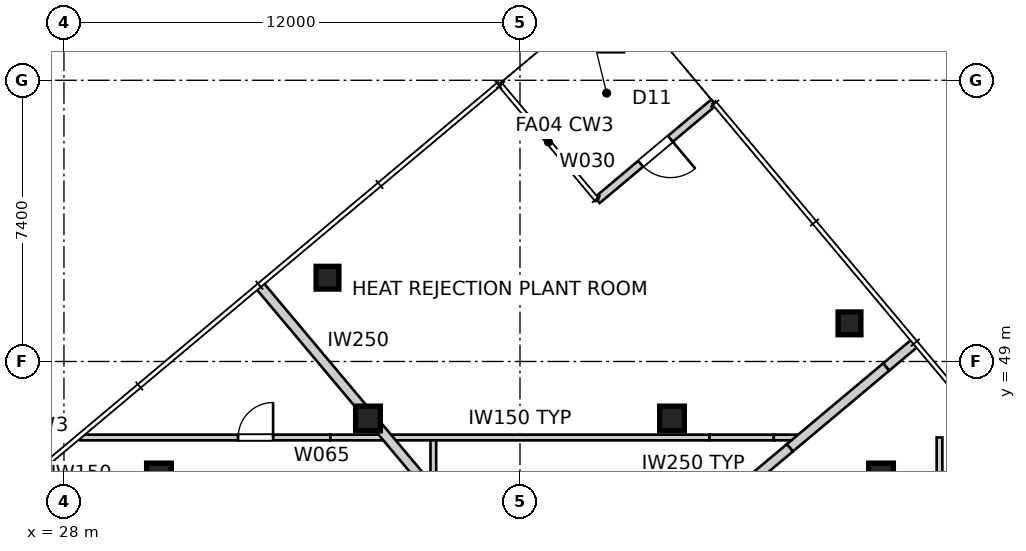
"""IFC4 building model, lengths in metres.
Left out: names, types, materials, properties, quantities, classifications, styles, units other than length and angle.
Written with IfcOpenShell. Run it as: python <this file> out.ifc"""

import sys

from ifc_helpers import new_model, si_unit, direction, frame, frame_2d, origin, origin_2d, place, context, subcontext, project, spatial, rectangle, extrude, element, fill, save


model = new_model("IFC4")
c1 = context("Model", 3, precision=1e-05, world=origin(), true_north=direction((0.0, 1.0)))
c2 = subcontext(c1, "Body", "Model", "MODEL_VIEW")
j1 = project(units=[si_unit("LENGTHUNIT", "METRE"), si_unit("PLANEANGLEUNIT", "RADIAN")], contexts=[c1])
p1 = place(None, origin())
s1 = spatial("IfcSite", under=j1, at=p1, CompositionType="ELEMENT")
p2 = place(p1, origin())
s2 = spatial("IfcBuilding", under=s1, at=p2, CompositionType="ELEMENT")
p3 = place(p2, frame((0.0, 0.0, 299.8)))
s3 = spatial("IfcBuildingStorey", under=s2, at=p3, CompositionType="ELEMENT", Elevation=299.8)
for number, where, z_axis, x_axis in (
    (1, (48.671, 50.003, 0.0), (0.0, 0.0, 1.0), (1.0, 0.0, 0.0)),
    (2, (34.935, 51.205, 0.0), (0.0, 0.0, 1.0), (1.0, 0.0, 0.0)),
):
    element("IfcColumn", number, at=place(p3, frame(where, z_axis=z_axis, x_axis=x_axis)), inside=s3, PredefinedType="COLUMN", context=c2, shape_type="SweptSolid", body=[
        extrude(rectangle(XDim=0.6, YDim=0.6, at=origin_2d()), origin(), (0.0, 0.0, 1.0), 4.5),
    ])
for number, where, z_axis, x_axis in (
    (3, (49.5, 46.0, 0.0), (0.0, 0.0, 1.0), (1.0, 0.0, 0.0)),
    (4, (44.0, 47.5, 0.0), (0.0, 0.0, 1.0), (1.0, 0.0, 0.0)),
    (5, (36.0, 47.5, 0.0), (0.0, 0.0, 1.0), (1.0, 0.0, 0.0)),
    (6, (30.5, 46.0, 0.0), (0.0, 0.0, 1.0), (1.0, 0.0, 0.0)),
):
    element("IfcColumn", number, at=place(p3, frame(where, z_axis=z_axis, x_axis=x_axis)), inside=s3, PredefinedType="COLUMN", context=c2, shape_type="SweptSolid", body=[
        extrude(rectangle(XDim=0.65, YDim=0.65, at=origin_2d()), origin(), (0.0, 0.0, 1.0), 4.5),
    ])
p4 = place(p3, frame((45.098, 55.817, 0.0), z_axis=(0.0, 0.0, 1.0), x_axis=(-0.766060656284, -0.642768287094, 0.0)))
e7 = element("IfcWall", 7, at=p4, inside=s3, PredefinedType="SOLIDWALL", context=c2, shape_type="SweptSolid", body=[
    extrude(rectangle(XDim=4.0, YDim=0.2, at=frame_2d((2.0, 0.0))), origin(), (0.0, 0.0, 1.0), 4.3),
])
p5 = place(p4, frame((1.49, 0.0, 0.0)))
e8 = element("IfcOpeningElement", 8, at=p5, cuts=e7, PredefinedType="OPENING", context=c2, shape_type="SweptSolid", body=[
    extrude(rectangle(XDim=1.02, YDim=2.1, at=frame_2d((0.51, 1.05))), frame((0.0, 0.11, 0.0), z_axis=(0.0, -1.0, 0.0), x_axis=(1.0, 0.0, 0.0)), (0.0, 0.0, 1.0), 0.22),
])
p6 = place(p3, frame((50.401, 49.497, 0.0), z_axis=(0.0, 0.0, 1.0), x_axis=(-0.766055819685, -0.64277405138, 0.0)))
e9 = element("IfcWall", 9, at=p6, inside=s3, PredefinedType="PARTITIONING", context=c2, shape_type="SweptSolid", body=[
    extrude(rectangle(XDim=1.0, YDim=0.25, at=frame_2d((0.5, 0.0))), origin(), (0.0, 0.0, 1.0), 4.3),
])
p7 = place(p3, frame((49.635, 48.854, 0.0), z_axis=(0.0, 0.0, 1.0), x_axis=(-0.766014492995, -0.642823301165, 0.0)))
e10 = element("IfcWall", 10, at=p7, inside=s3, PredefinedType="PARTITIONING", context=c2, shape_type="SweptSolid", body=[
    extrude(rectangle(XDim=3.308, YDim=0.25, at=frame_2d((1.654, 0.0))), origin(), (0.0, 0.0, 1.0), 3.688),
])
p8 = place(p3, frame((47.101, 46.728, 0.0), z_axis=(0.0, 0.0, 1.0), x_axis=(-0.766051985436, -0.642778620996, 0.0)))
e11 = element("IfcWall", 11, at=p8, inside=s3, PredefinedType="PARTITIONING", context=c2, shape_type="SweptSolid", body=[
    extrude(rectangle(XDim=4.446, YDim=0.25, at=frame_2d((2.223, 0.0))), origin(), (0.0, 0.0, 1.0), 4.3),
])
p9 = place(p3, frame((33.143, 51.007, 0.0), z_axis=(0.0, 0.0, 1.0), x_axis=(0.64278692291, -0.766045019392, 0.0)))
e12 = element("IfcWall", 12, at=p9, inside=s3, PredefinedType="PARTITIONING", context=c2, shape_type="SweptSolid", body=[
    extrude(rectangle(XDim=9.343, YDim=0.25, at=frame_2d((4.671, 0.0))), origin(), (0.0, 0.0, 1.0), 4.3),
])
for number, where, z_axis, x_axis in (
    (13, (51.039, 43.8, 0.0), (0.0, 0.0, 1.0), (0.0, 1.0, 0.0)),
    (14, (37.72, 47.0, 0.0), (0.0, 0.0, 1.0), (0.0, -1.0, 0.0)),
):
    element("IfcWall", number, at=place(p3, frame(where, z_axis=z_axis, x_axis=x_axis)), inside=s3, PredefinedType="SOLIDWALL", context=c2, shape_type="SweptSolid", body=[
        extrude(rectangle(XDim=3.2, YDim=0.15, at=frame_2d((1.6, 0.0))), origin(), (0.0, 0.0, 1.0), 4.3),
    ])
p10 = place(p3, frame((28.43, 47.0, 0.0), z_axis=(0.0, 0.0, 1.0), x_axis=(1.0, 0.0, 0.0)))
e15 = element("IfcWall", 15, at=p10, inside=s3, PredefinedType="SOLIDWALL", context=c2, shape_type="SweptSolid", body=[
    extrude(rectangle(XDim=4.154, YDim=0.15, at=frame_2d((2.077, 0.0))), origin(), (0.0, 0.0, 1.0), 4.3),
])
p11 = place(p3, frame((32.584, 47.0, 0.0), z_axis=(0.0, 0.0, 1.0), x_axis=(1.0, 0.0, 0.0)))
e16 = element("IfcWall", 16, at=p11, inside=s3, PredefinedType="SOLIDWALL", context=c2, shape_type="SweptSolid", body=[
    extrude(rectangle(XDim=2.428, YDim=0.15, at=frame_2d((1.214, 0.0))), origin(), (0.0, 0.0, 1.0), 3.3),
])
p12 = place(p11, origin())
e17 = element("IfcOpeningElement", 17, at=p12, cuts=e16, PredefinedType="OPENING", context=c2, shape_type="SweptSolid", body=[
    extrude(rectangle(XDim=0.92, YDim=2.1, at=frame_2d((0.46, 1.05))), frame((0.0, 0.085, 0.0), z_axis=(0.0, -1.0, 0.0), x_axis=(1.0, 0.0, 0.0)), (0.0, 0.0, 1.0), 0.17),
])
p13 = place(p3, frame((35.012, 47.0, 0.0), z_axis=(0.0, 0.0, 1.0), x_axis=(1.0, 0.0, 0.0)))
e18 = element("IfcWall", 18, at=p13, inside=s3, PredefinedType="SOLIDWALL", context=c2, shape_type="SweptSolid", body=[
    extrude(rectangle(XDim=9.977, YDim=0.15, at=frame_2d((4.988, 0.0))), origin(), (0.0, 0.0, 1.0), 4.3),
])
p14 = place(p3, frame((44.988, 47.0, 0.0), z_axis=(0.0, 0.0, 1.0), x_axis=(1.0, 0.0, 0.0)))
e19 = element("IfcWall", 19, at=p14, inside=s3, PredefinedType="SOLIDWALL", context=c2, shape_type="SweptSolid", body=[
    extrude(rectangle(XDim=1.69, YDim=0.15, at=frame_2d((0.845, 0.0))), origin(), (0.0, 0.0, 1.0), 3.3),
])
p15 = place(p3, frame((46.678, 47.0, 0.0), z_axis=(0.0, 0.0, 1.0), x_axis=(1.0, 0.0, 0.0)))
e20 = element("IfcWall", 20, at=p15, inside=s3, PredefinedType="SOLIDWALL", context=c2, shape_type="SweptSolid", body=[
    extrude(rectangle(XDim=0.747, YDim=0.15, at=frame_2d((0.373, 0.0))), origin(), (0.0, 0.0, 1.0), 4.3),
])
p16 = place(p5, origin())
e21 = element("IfcDoor", 21, at=p16, inside=s3, OperationType="SINGLE_SWING_LEFT", PredefinedType="DOOR", context=c2, shape_type="SweptSolid", body=[
    extrude(rectangle(XDim=1.02, YDim=2.1, at=frame_2d((0.51, 1.05))), frame((0.0, 0.025, 0.0), z_axis=(0.0, -1.0, 0.0), x_axis=(1.0, 0.0, 0.0)), (0.0, 0.0, 1.0), 0.05),
])
fill(e8, e21)
p17 = place(p12, origin())
e22 = element("IfcDoor", 22, at=p17, inside=s3, OperationType="SINGLE_SWING_RIGHT", PredefinedType="DOOR", context=c2, shape_type="SweptSolid", body=[
    extrude(rectangle(XDim=0.92, YDim=2.1, at=frame_2d((0.46, 1.05))), frame((0.0, 0.025, 0.0), z_axis=(0.0, -1.0, 0.0), x_axis=(1.0, 0.0, 0.0)), (0.0, 0.0, 1.0), 0.05),
])
fill(e17, e22)
save(model, sys.argv[1])
